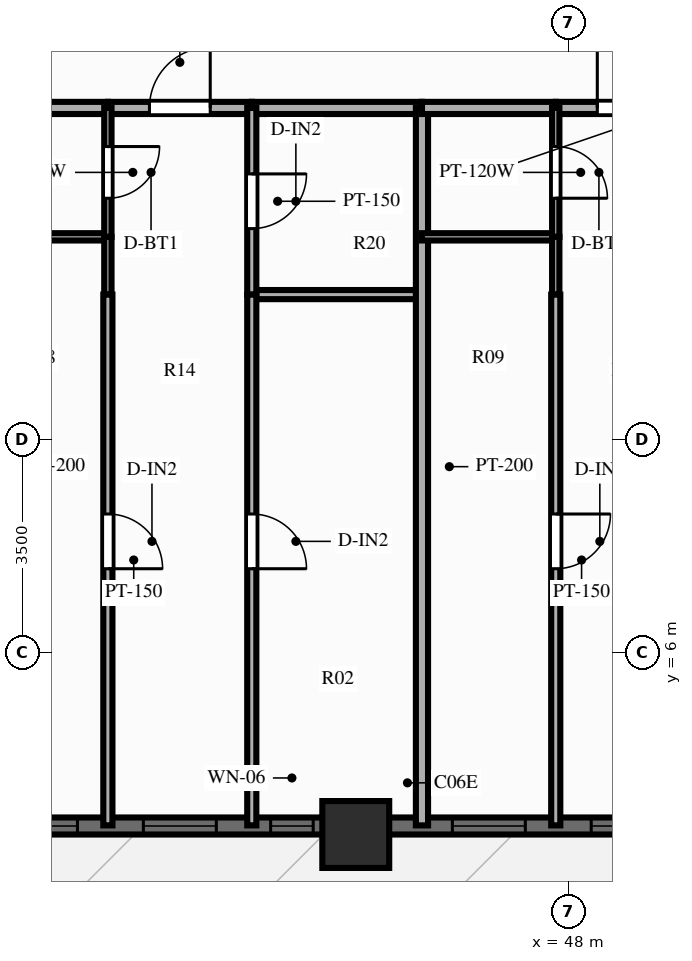
"""IFC4 building model, lengths in metres.
Left out: names, types, materials, properties, quantities, classifications, styles, units other than length and angle.
Written with IfcOpenShell. Run it as: python <this file> out.ifc"""

import sys

from ifc_helpers import new_model, si_unit, direction, frame, frame_2d, origin, origin_2d, place, context, subcontext, project, spatial, rectangle, extrude, source, transform, mapped, element, fill, save


model = new_model("IFC4")
c1 = context("Model", 3, precision=1e-05, world=origin(), true_north=direction((0.0, 1.0)))
c2 = subcontext(c1, "Body", "Model", "MODEL_VIEW")
j1 = project(units=[si_unit("LENGTHUNIT", "METRE"), si_unit("PLANEANGLEUNIT", "RADIAN")], contexts=[c1])
p1 = place(None, origin())
s1 = spatial("IfcSite", under=j1, at=p1, CompositionType="ELEMENT")
p2 = place(p1, origin())
s2 = spatial("IfcBuilding", under=s1, at=p2, CompositionType="ELEMENT")
p3 = place(p2, frame((0.0, 0.0, 19.4)))
s3 = spatial("IfcBuildingStorey", under=s2, at=p3, CompositionType="ELEMENT", Elevation=19.4)
m1 = source(origin(), c2, "Body", "SweptSolid", [
    extrude(rectangle(XDim=1.1, YDim=1.1, at=origin_2d()), origin(), (0.0, 0.0, 1.0), 3.0),
])
p4 = place(p3, frame((44.5, 3.0, 0.0), z_axis=(0.0, 0.0, 1.0), x_axis=(1.0, 0.0, 0.0)))
e1 = element("IfcColumn", 1, at=p4, inside=s3, PredefinedType="COLUMN", context=c2, shape_type="MappedRepresentation", body=[
    mapped(m1, transform((0.0, 0.0, 0.0), scale=1.0)),
])
p5 = place(p3, frame((15.5, 3.14, 0.0), z_axis=(0.0, 0.0, 1.0), x_axis=(1.0, 0.0, 0.0)))
e2 = element("IfcWall", 2, at=p5, inside=s3, PredefinedType="SOLIDWALL", context=c2, shape_type="SweptSolid", body=[
    extrude(rectangle(XDim=45.0, YDim=0.28, at=frame_2d((22.5, 0.0))), origin(), (0.0, 0.0, 1.0), 2.28),
])
p6 = place(p5, frame((0.785, 0.0, 0.25)))
e3 = element("IfcOpeningElement", 3, at=p6, cuts=e2, PredefinedType="OPENING", context=c2, shape_type="SweptSolid", body=[
    extrude(rectangle(XDim=1.2, YDim=1.5, at=frame_2d((0.6, 0.75))), frame((0.0, 0.152, 0.0), z_axis=(0.0, -1.0, 0.0), x_axis=(1.0, 0.0, 0.0)), (0.0, 0.0, 1.0), 0.304),
])
p7 = place(p5, frame((3.033, 0.0, 0.25)))
e4 = element("IfcOpeningElement", 4, at=p7, cuts=e2, PredefinedType="OPENING", context=c2, shape_type="SweptSolid", body=[
    extrude(rectangle(XDim=1.2, YDim=1.5, at=frame_2d((0.6, 0.75))), frame((0.0, 0.152, 0.0), z_axis=(0.0, -1.0, 0.0), x_axis=(1.0, 0.0, 0.0)), (0.0, 0.0, 1.0), 0.304),
])
p8 = place(p5, frame((5.727, 0.0, 0.25)))
e5 = element("IfcOpeningElement", 5, at=p8, cuts=e2, PredefinedType="OPENING", context=c2, shape_type="SweptSolid", body=[
    extrude(rectangle(XDim=1.2, YDim=1.5, at=frame_2d((0.6, 0.75))), frame((0.0, 0.152, 0.0), z_axis=(0.0, -1.0, 0.0), x_axis=(1.0, 0.0, 0.0)), (0.0, 0.0, 1.0), 0.304),
])
p9 = place(p5, frame((8.269, 0.0, 0.25)))
e6 = element("IfcOpeningElement", 6, at=p9, cuts=e2, PredefinedType="OPENING", context=c2, shape_type="SweptSolid", body=[
    extrude(rectangle(XDim=1.2, YDim=1.5, at=frame_2d((0.6, 0.75))), frame((0.0, 0.152, 0.0), z_axis=(0.0, -1.0, 0.0), x_axis=(1.0, 0.0, 0.0)), (0.0, 0.0, 1.0), 0.304),
])
p10 = place(p5, frame((10.621, 0.0, 0.25)))
e7 = element("IfcOpeningElement", 7, at=p10, cuts=e2, PredefinedType="OPENING", context=c2, shape_type="SweptSolid", body=[
    extrude(rectangle(XDim=1.2, YDim=1.5, at=frame_2d((0.6, 0.75))), frame((0.0, 0.152, 0.0), z_axis=(0.0, -1.0, 0.0), x_axis=(1.0, 0.0, 0.0)), (0.0, 0.0, 1.0), 0.304),
])
p11 = place(p5, frame((13.316, 0.0, 0.25)))
e8 = element("IfcOpeningElement", 8, at=p11, cuts=e2, PredefinedType="OPENING", context=c2, shape_type="SweptSolid", body=[
    extrude(rectangle(XDim=1.2, YDim=1.5, at=frame_2d((0.6, 0.75))), frame((0.0, 0.152, 0.0), z_axis=(0.0, -1.0, 0.0), x_axis=(1.0, 0.0, 0.0)), (0.0, 0.0, 1.0), 0.304),
])
p12 = place(p5, frame((16.624, 0.0, 0.25)))
e9 = element("IfcOpeningElement", 9, at=p12, cuts=e2, PredefinedType="OPENING", context=c2, shape_type="SweptSolid", body=[
    extrude(rectangle(XDim=0.7, YDim=1.5, at=frame_2d((0.35, 0.75))), frame((0.0, 0.152, 0.0), z_axis=(0.0, -1.0, 0.0), x_axis=(1.0, 0.0, 0.0)), (0.0, 0.0, 1.0), 0.304),
])
p13 = place(p5, frame((18.141, 0.0, 0.25)))
e10 = element("IfcOpeningElement", 10, at=p13, cuts=e2, PredefinedType="OPENING", context=c2, shape_type="SweptSolid", body=[
    extrude(rectangle(XDim=1.2, YDim=1.5, at=frame_2d((0.6, 0.75))), frame((0.0, 0.152, 0.0), z_axis=(0.0, -1.0, 0.0), x_axis=(1.0, 0.0, 0.0)), (0.0, 0.0, 1.0), 0.304),
])
p14 = place(p5, frame((21.874, 0.0, 0.0), z_axis=(0.0, 0.0, 1.0), x_axis=(-1.0, 0.0, 0.0)))
e11 = element("IfcOpeningElement", 11, at=p14, cuts=e2, PredefinedType="OPENING", context=c2, shape_type="SweptSolid", body=[
    extrude(rectangle(XDim=1.1, YDim=2.15, at=frame_2d((0.55, 1.075))), frame((0.0, 0.152, 0.0), z_axis=(0.0, -1.0, 0.0), x_axis=(1.0, 0.0, 0.0)), (0.0, 0.0, 1.0), 0.304),
])
p15 = place(p5, frame((23.223, 0.0, 0.25)))
e12 = element("IfcOpeningElement", 12, at=p15, cuts=e2, PredefinedType="OPENING", context=c2, shape_type="SweptSolid", body=[
    extrude(rectangle(XDim=1.2, YDim=1.5, at=frame_2d((0.6, 0.75))), frame((0.0, 0.152, 0.0), z_axis=(0.0, -1.0, 0.0), x_axis=(1.0, 0.0, 0.0)), (0.0, 0.0, 1.0), 0.304),
])
p16 = place(p5, frame((25.507, 0.0, 0.25)))
e13 = element("IfcOpeningElement", 13, at=p16, cuts=e2, PredefinedType="OPENING", context=c2, shape_type="SweptSolid", body=[
    extrude(rectangle(XDim=1.2, YDim=1.5, at=frame_2d((0.6, 0.75))), frame((0.0, 0.152, 0.0), z_axis=(0.0, -1.0, 0.0), x_axis=(1.0, 0.0, 0.0)), (0.0, 0.0, 1.0), 0.304),
])
p17 = place(p5, frame((27.6, 0.0, 0.25)))
e14 = element("IfcOpeningElement", 14, at=p17, cuts=e2, PredefinedType="OPENING", context=c2, shape_type="SweptSolid", body=[
    extrude(rectangle(XDim=0.7, YDim=1.5, at=frame_2d((0.35, 0.75))), frame((0.0, 0.152, 0.0), z_axis=(0.0, -1.0, 0.0), x_axis=(1.0, 0.0, 0.0)), (0.0, 0.0, 1.0), 0.304),
])
p18 = place(p5, frame((30.589, 0.0, 0.25)))
e15 = element("IfcOpeningElement", 15, at=p18, cuts=e2, PredefinedType="OPENING", context=c2, shape_type="SweptSolid", body=[
    extrude(rectangle(XDim=1.2, YDim=1.5, at=frame_2d((0.6, 0.75))), frame((0.0, 0.152, 0.0), z_axis=(0.0, -1.0, 0.0), x_axis=(1.0, 0.0, 0.0)), (0.0, 0.0, 1.0), 0.304),
])
p19 = place(p5, frame((32.872, 0.0, 0.25)))
e16 = element("IfcOpeningElement", 16, at=p19, cuts=e2, PredefinedType="OPENING", context=c2, shape_type="SweptSolid", body=[
    extrude(rectangle(XDim=1.2, YDim=1.5, at=frame_2d((0.6, 0.75))), frame((0.0, 0.152, 0.0), z_axis=(0.0, -1.0, 0.0), x_axis=(1.0, 0.0, 0.0)), (0.0, 0.0, 1.0), 0.304),
])
p20 = place(p5, frame((35.455, 0.0, 0.25)))
e17 = element("IfcOpeningElement", 17, at=p20, cuts=e2, PredefinedType="OPENING", context=c2, shape_type="SweptSolid", body=[
    extrude(rectangle(XDim=1.2, YDim=1.5, at=frame_2d((0.6, 0.75))), frame((0.0, 0.152, 0.0), z_axis=(0.0, -1.0, 0.0), x_axis=(1.0, 0.0, 0.0)), (0.0, 0.0, 1.0), 0.304),
])
p21 = place(p5, frame((37.954, 0.0, 0.25)))
e18 = element("IfcOpeningElement", 18, at=p21, cuts=e2, PredefinedType="OPENING", context=c2, shape_type="SweptSolid", body=[
    extrude(rectangle(XDim=1.2, YDim=1.5, at=frame_2d((0.6, 0.75))), frame((0.0, 0.152, 0.0), z_axis=(0.0, -1.0, 0.0), x_axis=(1.0, 0.0, 0.0)), (0.0, 0.0, 1.0), 0.304),
])
p22 = place(p5, frame((40.238, 0.0, 0.25)))
e19 = element("IfcOpeningElement", 19, at=p22, cuts=e2, PredefinedType="OPENING", context=c2, shape_type="SweptSolid", body=[
    extrude(rectangle(XDim=1.2, YDim=1.5, at=frame_2d((0.6, 0.75))), frame((0.0, 0.152, 0.0), z_axis=(0.0, -1.0, 0.0), x_axis=(1.0, 0.0, 0.0)), (0.0, 0.0, 1.0), 0.304),
])
p23 = place(p5, frame((42.716, 0.0, 0.25)))
e20 = element("IfcOpeningElement", 20, at=p23, cuts=e2, PredefinedType="OPENING", context=c2, shape_type="SweptSolid", body=[
    extrude(rectangle(XDim=1.2, YDim=1.5, at=frame_2d((0.6, 0.75))), frame((0.0, 0.152, 0.0), z_axis=(0.0, -1.0, 0.0), x_axis=(1.0, 0.0, 0.0)), (0.0, 0.0, 1.0), 0.304),
])
p24 = place(p3, frame((38.223, 14.95, 0.0), z_axis=(0.0, 0.0, 1.0), x_axis=(1.0, 0.0, 0.0)))
e21 = element("IfcWall", 21, at=p24, inside=s3, PredefinedType="PARTITIONING", context=c2, shape_type="SweptSolid", body=[
    extrude(rectangle(XDim=2.2, YDim=0.2, at=frame_2d((1.1, 0.0))), origin(), (0.0, 0.0, 1.0), 2.79),
])
p25 = place(p3, frame((40.423, 14.95, 0.0), z_axis=(0.0, 0.0, 1.0), x_axis=(1.0, 0.0, 0.0)))
e22 = element("IfcWall", 22, at=p25, inside=s3, PredefinedType="PARTITIONING", context=c2, shape_type="SweptSolid", body=[
    extrude(rectangle(XDim=2.367, YDim=0.2, at=frame_2d((1.183, 0.0))), origin(), (0.0, 0.0, 1.0), 2.79),
])
p26 = place(p25, frame((0.683, 0.0, 0.0)))
e23 = element("IfcOpeningElement", 23, at=p26, cuts=e22, PredefinedType="OPENING", context=c2, shape_type="SweptSolid", body=[
    extrude(rectangle(XDim=1.0, YDim=2.15, at=frame_2d((0.5, 1.075))), frame((0.0, 0.112, 0.0), z_axis=(0.0, -1.0, 0.0), x_axis=(1.0, 0.0, 0.0)), (0.0, 0.0, 1.0), 0.224),
])
p27 = place(p3, frame((42.79, 14.95, 0.0), z_axis=(0.0, 0.0, 1.0), x_axis=(1.0, 0.0, 0.0)))
e24 = element("IfcWall", 24, at=p27, inside=s3, PredefinedType="PARTITIONING", context=c2, shape_type="SweptSolid", body=[
    extrude(rectangle(XDim=2.799, YDim=0.2, at=frame_2d((1.399, 0.0))), origin(), (0.0, 0.0, 1.0), 2.79),
])
p28 = place(p3, frame((38.223, 12.83, 0.0), z_axis=(0.0, 0.0, 1.0), x_axis=(1.0, 0.0, 0.0)))
e25 = element("IfcWall", 25, at=p28, inside=s3, PredefinedType="PARTITIONING", context=c2, shape_type="SweptSolid", body=[
    extrude(rectangle(XDim=2.2, YDim=0.12, at=frame_2d((1.1, 0.0))), origin(), (0.0, 0.0, 1.0), 2.79),
])
p29 = place(p3, frame((42.79, 11.88, 0.0), z_axis=(0.0, 0.0, 1.0), x_axis=(1.0, 0.0, 0.0)))
e26 = element("IfcWall", 26, at=p29, inside=s3, PredefinedType="PARTITIONING", context=c2, shape_type="SweptSolid", body=[
    extrude(rectangle(XDim=2.799, YDim=0.15, at=frame_2d((1.399, 0.0))), origin(), (0.0, 0.0, 1.0), 2.79),
])
p30 = place(p3, frame((40.423, 14.95, 0.0), z_axis=(0.0, 0.0, 1.0), x_axis=(0.0, -1.0, 0.0)))
e27 = element("IfcWall", 27, at=p30, inside=s3, PredefinedType="PARTITIONING", context=c2, shape_type="SweptSolid", body=[
    extrude(rectangle(XDim=2.12, YDim=0.12, at=frame_2d((1.06, 0.0))), origin(), (0.0, 0.0, 1.0), 2.79),
])
p31 = place(p30, frame((0.635, 0.0, 0.0)))
e28 = element("IfcOpeningElement", 28, at=p31, cuts=e27, PredefinedType="OPENING", context=c2, shape_type="SweptSolid", body=[
    extrude(rectangle(XDim=0.85, YDim=2.05, at=frame_2d((0.425, 1.025))), frame((0.0, 0.072, 0.0), z_axis=(0.0, -1.0, 0.0), x_axis=(1.0, 0.0, 0.0)), (0.0, 0.0, 1.0), 0.144),
])
p32 = place(p3, frame((40.423, 12.83, 0.0), z_axis=(0.0, 0.0, 1.0), x_axis=(0.0, -1.0, 0.0)))
e29 = element("IfcWall", 29, at=p32, inside=s3, PredefinedType="PARTITIONING", context=c2, shape_type="SweptSolid", body=[
    extrude(rectangle(XDim=0.95, YDim=0.12, at=frame_2d((0.475, 0.0))), origin(), (0.0, 0.0, 1.0), 2.79),
])
p33 = place(p3, frame((40.423, 11.88, 0.0), z_axis=(0.0, 0.0, 1.0), x_axis=(0.0, -1.0, 0.0)))
e30 = element("IfcWall", 30, at=p33, inside=s3, PredefinedType="PARTITIONING", context=c2, shape_type="SweptSolid", body=[
    extrude(rectangle(XDim=8.73, YDim=0.15, at=frame_2d((4.365, 0.0))), origin(), (0.0, 0.0, 1.0), 2.79),
])
p34 = place(p33, frame((3.609, 0.0, 0.0)))
e31 = element("IfcOpeningElement", 31, at=p34, cuts=e30, PredefinedType="OPENING", context=c2, shape_type="SweptSolid", body=[
    extrude(rectangle(XDim=0.9, YDim=2.1, at=frame_2d((0.45, 1.05))), frame((0.0, 0.087, 0.0), z_axis=(0.0, -1.0, 0.0), x_axis=(1.0, 0.0, 0.0)), (0.0, 0.0, 1.0), 0.174),
])
p35 = place(p3, frame((42.79, 14.95, 0.0), z_axis=(0.0, 0.0, 1.0), x_axis=(0.0, -1.0, 0.0)))
e32 = element("IfcWall", 32, at=p35, inside=s3, PredefinedType="PARTITIONING", context=c2, shape_type="SweptSolid", body=[
    extrude(rectangle(XDim=3.07, YDim=0.15, at=frame_2d((1.535, 0.0))), origin(), (0.0, 0.0, 1.0), 2.79),
])
p36 = place(p35, frame((1.085, 0.0, 0.0)))
e33 = element("IfcOpeningElement", 33, at=p36, cuts=e32, PredefinedType="OPENING", context=c2, shape_type="SweptSolid", body=[
    extrude(rectangle(XDim=0.9, YDim=2.1, at=frame_2d((0.45, 1.05))), frame((0.0, 0.087, 0.0), z_axis=(0.0, -1.0, 0.0), x_axis=(1.0, 0.0, 0.0)), (0.0, 0.0, 1.0), 0.174),
])
p37 = place(p3, frame((42.79, 11.88, 0.0), z_axis=(0.0, 0.0, 1.0), x_axis=(0.0, -1.0, 0.0)))
e34 = element("IfcWall", 34, at=p37, inside=s3, PredefinedType="PARTITIONING", context=c2, shape_type="SweptSolid", body=[
    extrude(rectangle(XDim=8.73, YDim=0.15, at=frame_2d((4.365, 0.0))), origin(), (0.0, 0.0, 1.0), 2.79),
])
p38 = place(p37, frame((3.609, 0.0, 0.0)))
e35 = element("IfcOpeningElement", 35, at=p38, cuts=e34, PredefinedType="OPENING", context=c2, shape_type="SweptSolid", body=[
    extrude(rectangle(XDim=0.9, YDim=2.1, at=frame_2d((0.45, 1.05))), frame((0.0, 0.087, 0.0), z_axis=(0.0, -1.0, 0.0), x_axis=(1.0, 0.0, 0.0)), (0.0, 0.0, 1.0), 0.174),
])
p39 = place(p3, frame((45.589, 14.95, 0.0), z_axis=(0.0, 0.0, 1.0), x_axis=(0.0, -1.0, 0.0)))
e36 = element("IfcWall", 36, at=p39, inside=s3, PredefinedType="PARTITIONING", context=c2, shape_type="SweptSolid", body=[
    extrude(rectangle(XDim=11.8, YDim=0.2, at=frame_2d((5.9, 0.0))), origin(), (0.0, 0.0, 1.0), 2.24),
])
p40 = place(p3, frame((45.589, 14.95, 0.0), z_axis=(0.0, 0.0, 1.0), x_axis=(1.0, 0.0, 0.0)))
e37 = element("IfcWall", 37, at=p40, inside=s3, PredefinedType="PARTITIONING", context=c2, shape_type="SweptSolid", body=[
    extrude(rectangle(XDim=2.2, YDim=0.2, at=frame_2d((1.1, 0.0))), origin(), (0.0, 0.0, 1.0), 2.79),
])
p41 = place(p3, frame((47.789, 14.95, 0.0), z_axis=(0.0, 0.0, 1.0), x_axis=(1.0, 0.0, 0.0)))
e38 = element("IfcWall", 38, at=p41, inside=s3, PredefinedType="PARTITIONING", context=c2, shape_type="SweptSolid", body=[
    extrude(rectangle(XDim=2.367, YDim=0.2, at=frame_2d((1.183, 0.0))), origin(), (0.0, 0.0, 1.0), 2.79),
])
p42 = place(p41, frame((0.683, 0.0, 0.0)))
e39 = element("IfcOpeningElement", 39, at=p42, cuts=e38, PredefinedType="OPENING", context=c2, shape_type="SweptSolid", body=[
    extrude(rectangle(XDim=1.0, YDim=2.15, at=frame_2d((0.5, 1.075))), frame((0.0, 0.112, 0.0), z_axis=(0.0, -1.0, 0.0), x_axis=(1.0, 0.0, 0.0)), (0.0, 0.0, 1.0), 0.224),
])
p43 = place(p3, frame((45.589, 12.83, 0.0), z_axis=(0.0, 0.0, 1.0), x_axis=(1.0, 0.0, 0.0)))
e40 = element("IfcWall", 40, at=p43, inside=s3, PredefinedType="PARTITIONING", context=c2, shape_type="SweptSolid", body=[
    extrude(rectangle(XDim=2.2, YDim=0.12, at=frame_2d((1.1, 0.0))), origin(), (0.0, 0.0, 1.0), 2.79),
])
p44 = place(p3, frame((47.789, 14.95, 0.0), z_axis=(0.0, 0.0, 1.0), x_axis=(0.0, -1.0, 0.0)))
e41 = element("IfcWall", 41, at=p44, inside=s3, PredefinedType="PARTITIONING", context=c2, shape_type="SweptSolid", body=[
    extrude(rectangle(XDim=2.12, YDim=0.12, at=frame_2d((1.06, 0.0))), origin(), (0.0, 0.0, 1.0), 2.79),
])
p45 = place(p44, frame((0.635, 0.0, 0.0)))
e42 = element("IfcOpeningElement", 42, at=p45, cuts=e41, PredefinedType="OPENING", context=c2, shape_type="SweptSolid", body=[
    extrude(rectangle(XDim=0.85, YDim=2.05, at=frame_2d((0.425, 1.025))), frame((0.0, 0.072, 0.0), z_axis=(0.0, -1.0, 0.0), x_axis=(1.0, 0.0, 0.0)), (0.0, 0.0, 1.0), 0.144),
])
p46 = place(p3, frame((47.789, 12.83, 0.0), z_axis=(0.0, 0.0, 1.0), x_axis=(0.0, -1.0, 0.0)))
e43 = element("IfcWall", 43, at=p46, inside=s3, PredefinedType="PARTITIONING", context=c2, shape_type="SweptSolid", body=[
    extrude(rectangle(XDim=0.95, YDim=0.12, at=frame_2d((0.475, 0.0))), origin(), (0.0, 0.0, 1.0), 2.79),
])
p47 = place(p3, frame((47.789, 11.88, 0.0), z_axis=(0.0, 0.0, 1.0), x_axis=(0.0, -1.0, 0.0)))
e44 = element("IfcWall", 44, at=p47, inside=s3, PredefinedType="PARTITIONING", context=c2, shape_type="SweptSolid", body=[
    extrude(rectangle(XDim=8.73, YDim=0.15, at=frame_2d((4.365, 0.0))), origin(), (0.0, 0.0, 1.0), 2.79),
])
p48 = place(p47, frame((3.609, 0.0, 0.0)))
e45 = element("IfcOpeningElement", 45, at=p48, cuts=e44, PredefinedType="OPENING", context=c2, shape_type="SweptSolid", body=[
    extrude(rectangle(XDim=0.9, YDim=2.1, at=frame_2d((0.45, 1.05))), frame((0.0, 0.087, 0.0), z_axis=(0.0, -1.0, 0.0), x_axis=(1.0, 0.0, 0.0)), (0.0, 0.0, 1.0), 0.174),
])
m2 = source(origin(), c2, "Body", "SweptSolid", [
    extrude(rectangle(XDim=1.2, YDim=1.5, at=frame_2d((0.6, 0.75))), frame((0.0, 0.03, 0.0), z_axis=(0.0, -1.0, 0.0), x_axis=(1.0, 0.0, 0.0)), (0.0, 0.0, 1.0), 0.06),
])
p49 = place(p15, origin())
e46 = element("IfcWindow", 46, at=p49, inside=s3, PartitioningType="SINGLE_PANEL", PredefinedType="WINDOW", context=c2, shape_type="MappedRepresentation", body=[
    mapped(m2, transform((0.0, 0.0, 0.0), scale=1.0)),
])
fill(e12, e46)
p50 = place(p16, origin())
e47 = element("IfcWindow", 47, at=p50, inside=s3, PartitioningType="SINGLE_PANEL", PredefinedType="WINDOW", context=c2, shape_type="MappedRepresentation", body=[
    mapped(m2, transform((0.0, 0.0, 0.0), scale=1.0)),
])
fill(e13, e47)
m3 = source(origin(), c2, "Body", "SweptSolid", [
    extrude(rectangle(XDim=0.7, YDim=1.5, at=frame_2d((0.35, 0.75))), frame((0.0, 0.03, 0.0), z_axis=(0.0, -1.0, 0.0), x_axis=(1.0, 0.0, 0.0)), (0.0, 0.0, 1.0), 0.06),
])
p51 = place(p17, origin())
e48 = element("IfcWindow", 48, at=p51, inside=s3, PartitioningType="SINGLE_PANEL", PredefinedType="WINDOW", context=c2, shape_type="MappedRepresentation", body=[
    mapped(m3, transform((0.0, 0.0, 0.0), scale=1.0)),
])
fill(e14, e48)
p52 = place(p18, origin())
e49 = element("IfcWindow", 49, at=p52, inside=s3, PartitioningType="SINGLE_PANEL", PredefinedType="WINDOW", context=c2, shape_type="MappedRepresentation", body=[
    mapped(m2, transform((0.0, 0.0, 0.0), scale=1.0)),
])
fill(e15, e49)
p53 = place(p19, origin())
e50 = element("IfcWindow", 50, at=p53, inside=s3, PartitioningType="SINGLE_PANEL", PredefinedType="WINDOW", context=c2, shape_type="MappedRepresentation", body=[
    mapped(m2, transform((0.0, 0.0, 0.0), scale=1.0)),
])
fill(e16, e50)
m4 = source(origin(), c2, "Body", "SweptSolid", [
    extrude(rectangle(XDim=1.0, YDim=2.15, at=frame_2d((0.5, 1.075))), frame((0.0, 0.025, 0.0), z_axis=(0.0, -1.0, 0.0), x_axis=(1.0, 0.0, 0.0)), (0.0, 0.0, 1.0), 0.05),
])
p54 = place(p26, origin())
e51 = element("IfcDoor", 51, at=p54, inside=s3, OperationType="SINGLE_SWING_RIGHT", PredefinedType="DOOR", context=c2, shape_type="MappedRepresentation", body=[
    mapped(m4, transform((0.0, 0.0, 0.0), scale=1.0)),
])
fill(e23, e51)
m5 = source(origin(), c2, "Body", "SweptSolid", [
    extrude(rectangle(XDim=0.85, YDim=2.05, at=frame_2d((0.425, 1.025))), frame((0.0, 0.025, 0.0), z_axis=(0.0, -1.0, 0.0), x_axis=(1.0, 0.0, 0.0)), (0.0, 0.0, 1.0), 0.05),
])
p55 = place(p31, origin())
e52 = element("IfcDoor", 52, at=p55, inside=s3, OperationType="SINGLE_SWING_LEFT", PredefinedType="DOOR", context=c2, shape_type="MappedRepresentation", body=[
    mapped(m5, transform((0.0, 0.0, 0.0), scale=1.0)),
])
fill(e28, e52)
m6 = source(origin(), c2, "Body", "SweptSolid", [
    extrude(rectangle(XDim=0.9, YDim=2.1, at=frame_2d((0.45, 1.05))), frame((0.0, 0.025, 0.0), z_axis=(0.0, -1.0, 0.0), x_axis=(1.0, 0.0, 0.0)), (0.0, 0.0, 1.0), 0.05),
])
p56 = place(p34, origin())
e53 = element("IfcDoor", 53, at=p56, inside=s3, OperationType="SINGLE_SWING_RIGHT", PredefinedType="DOOR", context=c2, shape_type="MappedRepresentation", body=[
    mapped(m6, transform((0.0, 0.0, 0.0), scale=1.0)),
])
fill(e31, e53)
p57 = place(p36, origin())
e54 = element("IfcDoor", 54, at=p57, inside=s3, OperationType="SINGLE_SWING_LEFT", PredefinedType="DOOR", context=c2, shape_type="MappedRepresentation", body=[
    mapped(m6, transform((0.0, 0.0, 0.0), scale=1.0)),
])
fill(e33, e54)
p58 = place(p38, origin())
e55 = element("IfcDoor", 55, at=p58, inside=s3, OperationType="SINGLE_SWING_RIGHT", PredefinedType="DOOR", context=c2, shape_type="MappedRepresentation", body=[
    mapped(m6, transform((0.0, 0.0, 0.0), scale=1.0)),
])
fill(e35, e55)
p59 = place(p42, origin())
e56 = element("IfcDoor", 56, at=p59, inside=s3, OperationType="SINGLE_SWING_LEFT", PredefinedType="DOOR", context=c2, shape_type="MappedRepresentation", body=[
    mapped(m4, transform((0.0, 0.0, 0.0), scale=1.0)),
])
fill(e39, e56)
p60 = place(p45, origin())
e57 = element("IfcDoor", 57, at=p60, inside=s3, OperationType="SINGLE_SWING_RIGHT", PredefinedType="DOOR", context=c2, shape_type="MappedRepresentation", body=[
    mapped(m5, transform((0.0, 0.0, 0.0), scale=1.0)),
])
fill(e42, e57)
p61 = place(p48, origin())
e58 = element("IfcDoor", 58, at=p61, inside=s3, OperationType="SINGLE_SWING_LEFT", PredefinedType="DOOR", context=c2, shape_type="MappedRepresentation", body=[
    mapped(m6, transform((0.0, 0.0, 0.0), scale=1.0)),
])
fill(e45, e58)
save(model, sys.argv[1])
